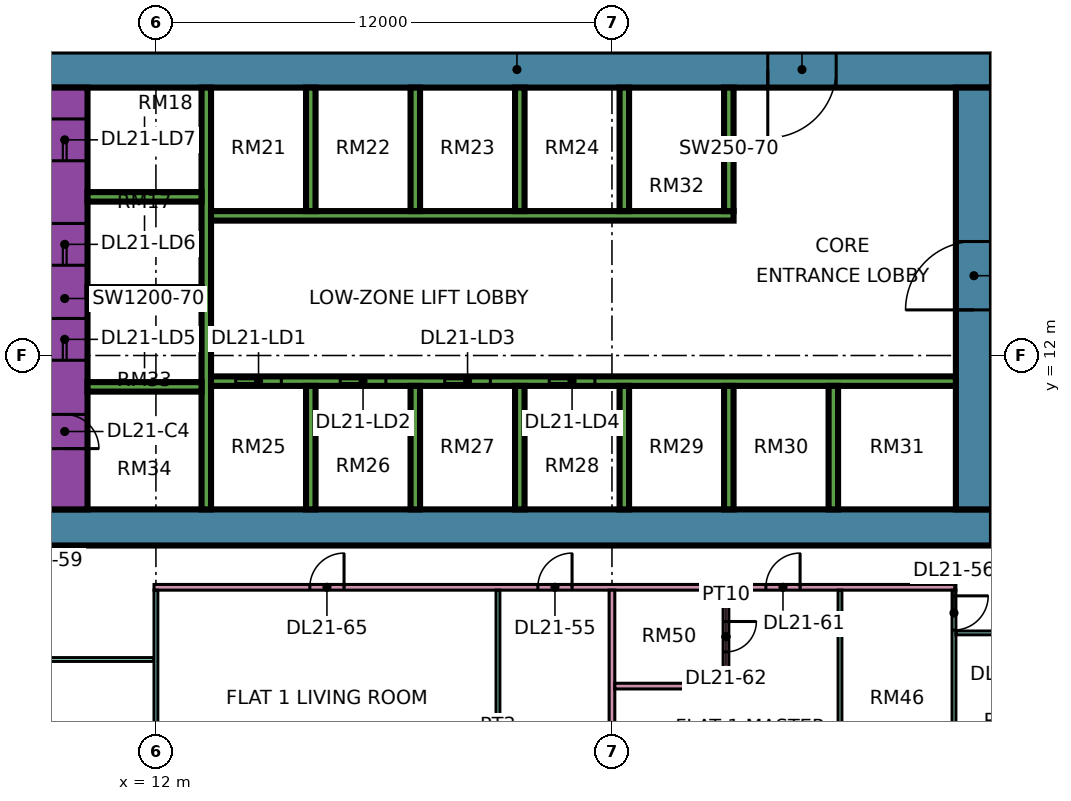
"""IFC4 building model, lengths in metres.
Left out: names, types, materials, properties, quantities, classifications, styles, units other than length and angle.
Written with IfcOpenShell. Run it as: python <this file> out.ifc"""

import sys

from ifc_helpers import new_model, si_unit, direction, frame, frame_2d, origin, place, context, subcontext, project, spatial, rectangle, extrude, element, fill, save


model = new_model("IFC4")
c1 = context("Model", 3, precision=1e-05, world=origin(), true_north=direction((0.0, 1.0)))
c2 = subcontext(c1, "Body", "Model", "MODEL_VIEW")
j1 = project(units=[si_unit("LENGTHUNIT", "METRE"), si_unit("PLANEANGLEUNIT", "RADIAN")], contexts=[c1])
p1 = place(None, origin())
s1 = spatial("IfcSite", under=j1, at=p1, CompositionType="ELEMENT")
p2 = place(p1, origin())
s2 = spatial("IfcBuilding", under=s1, at=p2, CompositionType="ELEMENT")
p3 = place(p2, frame((0.0, 0.0, 95.65)))
s3 = spatial("IfcBuildingStorey", under=s2, at=p3, CompositionType="ELEMENT", Elevation=95.65)
p4 = place(p3, frame((9.0, 7.475, 0.0), z_axis=(0.0, 0.0, 1.0), x_axis=(1.0, 0.0, 0.0)))
e1 = element("IfcWall", 1, at=p4, inside=s3, PredefinedType="SHEAR", context=c2, shape_type="SweptSolid", body=[
    extrude(rectangle(XDim=25.0, YDim=0.95, at=frame_2d((12.5, 0.0))), origin(), (0.0, 0.0, 1.0), 3.75),
])
p5 = place(p3, frame((9.0, 19.525, 0.0), z_axis=(0.0, 0.0, 1.0), x_axis=(1.0, 0.0, 0.0)))
e2 = element("IfcWall", 2, at=p5, inside=s3, PredefinedType="SHEAR", context=c2, shape_type="SweptSolid", body=[
    extrude(rectangle(XDim=25.0, YDim=0.95, at=frame_2d((12.5, 0.0))), origin(), (0.0, 0.0, 1.0), 3.75),
])
p6 = place(p5, frame((19.1, 0.0, 0.0)))
e3 = element("IfcOpeningElement", 3, at=p6, cuts=e2, PredefinedType="OPENING", context=c2, shape_type="SweptSolid", body=[
    extrude(rectangle(XDim=1.8, YDim=2.4, at=frame_2d((0.9, 1.2))), frame((0.0, 0.485, 0.0), z_axis=(0.0, -1.0, 0.0), x_axis=(1.0, 0.0, 0.0)), (0.0, 0.0, 1.0), 0.97),
])
p7 = place(p3, frame((9.6, 7.95, 0.0), z_axis=(0.0, 0.0, 1.0), x_axis=(0.0, 1.0, 0.0)))
e4 = element("IfcWall", 4, at=p7, inside=s3, PredefinedType="SHEAR", context=c2, shape_type="SweptSolid", body=[
    extrude(rectangle(XDim=11.1, YDim=1.2, at=frame_2d((5.55, 0.0))), origin(), (0.0, 0.0, 1.0), 3.75),
])
p8 = place(p7, frame((3.925, 0.0, 0.0)))
e5 = element("IfcOpeningElement", 5, at=p8, cuts=e4, PredefinedType="OPENING", context=c2, shape_type="SweptSolid", body=[
    extrude(rectangle(XDim=1.1, YDim=2.2, at=frame_2d((0.55, 1.1))), frame((0.0, 0.61, 0.0), z_axis=(0.0, -1.0, 0.0), x_axis=(1.0, 0.0, 0.0)), (0.0, 0.0, 1.0), 1.22),
])
p9 = place(p7, frame((6.425, 0.0, 0.0)))
e6 = element("IfcOpeningElement", 6, at=p9, cuts=e4, PredefinedType="OPENING", context=c2, shape_type="SweptSolid", body=[
    extrude(rectangle(XDim=1.1, YDim=2.2, at=frame_2d((0.55, 1.1))), frame((0.0, 0.61, 0.0), z_axis=(0.0, -1.0, 0.0), x_axis=(1.0, 0.0, 0.0)), (0.0, 0.0, 1.0), 1.22),
])
p10 = place(p7, frame((9.175, 0.0, 0.0)))
e7 = element("IfcOpeningElement", 7, at=p10, cuts=e4, PredefinedType="OPENING", context=c2, shape_type="SweptSolid", body=[
    extrude(rectangle(XDim=1.1, YDim=2.2, at=frame_2d((0.55, 1.1))), frame((0.0, 0.61, 0.0), z_axis=(0.0, -1.0, 0.0), x_axis=(1.0, 0.0, 0.0)), (0.0, 0.0, 1.0), 1.22),
])
p11 = place(p7, frame((1.6, 0.0, 0.0)))
e8 = element("IfcOpeningElement", 8, at=p11, cuts=e4, PredefinedType="OPENING", context=c2, shape_type="SweptSolid", body=[
    extrude(rectangle(XDim=0.9, YDim=2.1, at=frame_2d((0.45, 1.05))), frame((0.0, 0.61, 0.0), z_axis=(0.0, -1.0, 0.0), x_axis=(1.0, 0.0, 0.0)), (0.0, 0.0, 1.0), 1.22),
])
p12 = place(p3, frame((33.525, 7.95, 0.0), z_axis=(0.0, 0.0, 1.0), x_axis=(0.0, 1.0, 0.0)))
e9 = element("IfcWall", 9, at=p12, inside=s3, PredefinedType="SHEAR", context=c2, shape_type="SweptSolid", body=[
    extrude(rectangle(XDim=11.1, YDim=0.95, at=frame_2d((5.55, 0.0))), origin(), (0.0, 0.0, 1.0), 3.75),
])
p13 = place(p12, frame((5.25, 0.0, 0.0)))
e10 = element("IfcOpeningElement", 10, at=p13, cuts=e9, PredefinedType="OPENING", context=c2, shape_type="SweptSolid", body=[
    extrude(rectangle(XDim=1.8, YDim=2.4, at=frame_2d((0.9, 1.2))), frame((0.0, 0.485, 0.0), z_axis=(0.0, -1.0, 0.0), x_axis=(1.0, 0.0, 0.0)), (0.0, 0.0, 1.0), 0.97),
])
p14 = place(p3, frame((13.325, 7.95, 0.0), z_axis=(0.0, 0.0, 1.0), x_axis=(0.0, 1.0, 0.0)))
e11 = element("IfcWall", 11, at=p14, inside=s3, PredefinedType="SHEAR", context=c2, shape_type="SweptSolid", body=[
    extrude(rectangle(XDim=11.1, YDim=0.25, at=frame_2d((5.55, 0.0))), origin(), (0.0, 0.0, 1.0), 3.75),
])
p15 = place(p3, frame((13.45, 11.325, 0.0), z_axis=(0.0, 0.0, 1.0), x_axis=(1.0, 0.0, 0.0)))
e12 = element("IfcWall", 12, at=p15, inside=s3, PredefinedType="SHEAR", context=c2, shape_type="SweptSolid", body=[
    extrude(rectangle(XDim=19.6, YDim=0.25, at=frame_2d((9.8, 0.0))), origin(), (0.0, 0.0, 1.0), 3.75),
])
p16 = place(p15, frame((0.65, 0.0, 0.0)))
e13 = element("IfcOpeningElement", 13, at=p16, cuts=e12, PredefinedType="OPENING", context=c2, shape_type="SweptSolid", body=[
    extrude(rectangle(XDim=1.2, YDim=2.2, at=frame_2d((0.6, 1.1))), frame((0.0, 0.135, 0.0), z_axis=(0.0, -1.0, 0.0), x_axis=(1.0, 0.0, 0.0)), (0.0, 0.0, 1.0), 0.27),
])
p17 = place(p15, frame((3.4, 0.0, 0.0)))
e14 = element("IfcOpeningElement", 14, at=p17, cuts=e12, PredefinedType="OPENING", context=c2, shape_type="SweptSolid", body=[
    extrude(rectangle(XDim=1.2, YDim=2.2, at=frame_2d((0.6, 1.1))), frame((0.0, 0.135, 0.0), z_axis=(0.0, -1.0, 0.0), x_axis=(1.0, 0.0, 0.0)), (0.0, 0.0, 1.0), 0.27),
])
p18 = place(p15, frame((6.15, 0.0, 0.0)))
e15 = element("IfcOpeningElement", 15, at=p18, cuts=e12, PredefinedType="OPENING", context=c2, shape_type="SweptSolid", body=[
    extrude(rectangle(XDim=1.2, YDim=2.2, at=frame_2d((0.6, 1.1))), frame((0.0, 0.135, 0.0), z_axis=(0.0, -1.0, 0.0), x_axis=(1.0, 0.0, 0.0)), (0.0, 0.0, 1.0), 0.27),
])
p19 = place(p15, frame((8.9, 0.0, 0.0)))
e16 = element("IfcOpeningElement", 16, at=p19, cuts=e12, PredefinedType="OPENING", context=c2, shape_type="SweptSolid", body=[
    extrude(rectangle(XDim=1.2, YDim=2.2, at=frame_2d((0.6, 1.1))), frame((0.0, 0.135, 0.0), z_axis=(0.0, -1.0, 0.0), x_axis=(1.0, 0.0, 0.0)), (0.0, 0.0, 1.0), 0.27),
])
p20 = place(p3, frame((13.45, 15.675, 0.0), z_axis=(0.0, 0.0, 1.0), x_axis=(1.0, 0.0, 0.0)))
e17 = element("IfcWall", 17, at=p20, inside=s3, PredefinedType="SHEAR", context=c2, shape_type="SweptSolid", body=[
    extrude(rectangle(XDim=13.75, YDim=0.25, at=frame_2d((6.875, 0.0))), origin(), (0.0, 0.0, 1.0), 3.75),
])
for number, where, z_axis, x_axis in (
    (18, (10.2, 11.175, 0.0), (0.0, 0.0, 1.0), (1.0, 0.0, 0.0)),
    (19, (10.2, 13.675, 0.0), (0.0, 0.0, 1.0), (1.0, 0.0, 0.0)),
    (20, (10.2, 16.175, 0.0), (0.0, 0.0, 1.0), (1.0, 0.0, 0.0)),
):
    element("IfcWall", number, at=place(p3, frame(where, z_axis=z_axis, x_axis=x_axis)), inside=s3, PredefinedType="SHEAR", context=c2, shape_type="SweptSolid", body=[
        extrude(rectangle(XDim=3.0, YDim=0.25, at=frame_2d((1.5, 0.0))), origin(), (0.0, 0.0, 1.0), 3.75),
    ])
for number, where, z_axis, x_axis in (
    (21, (16.075, 7.95, 0.0), (0.0, 0.0, 1.0), (0.0, 1.0, 0.0)),
    (22, (18.825, 7.95, 0.0), (0.0, 0.0, 1.0), (0.0, 1.0, 0.0)),
    (23, (21.575, 7.95, 0.0), (0.0, 0.0, 1.0), (0.0, 1.0, 0.0)),
    (24, (24.325, 7.95, 0.0), (0.0, 0.0, 1.0), (0.0, 1.0, 0.0)),
    (25, (27.075, 7.95, 0.0), (0.0, 0.0, 1.0), (0.0, 1.0, 0.0)),
    (26, (29.825, 7.95, 0.0), (0.0, 0.0, 1.0), (0.0, 1.0, 0.0)),
    (27, (16.075, 15.8, 0.0), (0.0, 0.0, 1.0), (0.0, 1.0, 0.0)),
    (28, (18.825, 15.8, 0.0), (0.0, 0.0, 1.0), (0.0, 1.0, 0.0)),
    (29, (21.575, 15.8, 0.0), (0.0, 0.0, 1.0), (0.0, 1.0, 0.0)),
    (30, (24.325, 15.8, 0.0), (0.0, 0.0, 1.0), (0.0, 1.0, 0.0)),
    (31, (27.075, 15.8, 0.0), (0.0, 0.0, 1.0), (0.0, 1.0, 0.0)),
):
    element("IfcWall", number, at=place(p3, frame(where, z_axis=z_axis, x_axis=x_axis)), inside=s3, PredefinedType="SHEAR", context=c2, shape_type="SweptSolid", body=[
        extrude(rectangle(XDim=3.25, YDim=0.25, at=frame_2d((1.625, 0.0))), origin(), (0.0, 0.0, 1.0), 3.75),
    ])
p21 = place(p3, frame((-1.447, 12.553, 0.0), z_axis=(0.0, 0.0, 1.0), x_axis=(0.707106781187, -0.707106781187, 0.0)))
e32 = element("IfcWall", 32, at=p21, inside=s3, PredefinedType="SOLIDWALL", context=c2, shape_type="SweptSolid", body=[
    extrude(rectangle(XDim=19.799, YDim=0.15, at=frame_2d((9.899, 0.0))), origin(), (0.0, 0.0, 1.0), 3.35),
])
p22 = place(p21, frame((2.212, 0.0, 0.45)))
e33 = element("IfcOpeningElement", 33, at=p22, cuts=e32, PredefinedType="OPENING", context=c2, shape_type="SweptSolid", body=[
    extrude(rectangle(XDim=3.0, YDim=2.4, at=frame_2d((1.5, 1.2))), frame((0.0, 0.085, 0.0), z_axis=(0.0, -1.0, 0.0), x_axis=(1.0, 0.0, 0.0)), (0.0, 0.0, 1.0), 0.17),
])
p23 = place(p21, frame((10.216, 0.0, 0.45)))
e34 = element("IfcOpeningElement", 34, at=p23, cuts=e32, PredefinedType="OPENING", context=c2, shape_type="SweptSolid", body=[
    extrude(rectangle(XDim=3.0, YDim=2.4, at=frame_2d((1.5, 1.2))), frame((0.0, 0.085, 0.0), z_axis=(0.0, -1.0, 0.0), x_axis=(1.0, 0.0, 0.0)), (0.0, 0.0, 1.0), 0.17),
])
p24 = place(p3, frame((9.05, 4.0, 0.0), z_axis=(0.0, 0.0, 1.0), x_axis=(1.0, 0.0, 0.0)))
e35 = element("IfcWall", 35, at=p24, inside=s3, PredefinedType="PARTITIONING", context=c2, shape_type="SweptSolid", body=[
    extrude(rectangle(XDim=2.9, YDim=0.1, at=frame_2d((1.45, 0.0))), origin(), (0.0, 0.0, 1.0), 3.35),
])
p25 = place(p3, frame((11.95, 5.9, 0.0), z_axis=(0.0, 0.0, 1.0), x_axis=(1.0, 0.0, 0.0)))
e36 = element("IfcWall", 36, at=p25, inside=s3, PredefinedType="PARTITIONING", context=c2, shape_type="SweptSolid", body=[
    extrude(rectangle(XDim=21.1, YDim=0.15, at=frame_2d((10.55, 0.0))), origin(), (0.0, 0.0, 1.0), 3.35),
])
p26 = place(p25, frame((10.1, 0.0, 0.0)))
e37 = element("IfcOpeningElement", 37, at=p26, cuts=e36, PredefinedType="OPENING", context=c2, shape_type="SweptSolid", body=[
    extrude(rectangle(XDim=0.9, YDim=2.1, at=frame_2d((0.45, 1.05))), frame((0.0, 0.085, 0.0), z_axis=(0.0, -1.0, 0.0), x_axis=(1.0, 0.0, 0.0)), (0.0, 0.0, 1.0), 0.17),
])
p27 = place(p25, frame((16.1, 0.0, 0.0)))
e38 = element("IfcOpeningElement", 38, at=p27, cuts=e36, PredefinedType="OPENING", context=c2, shape_type="SweptSolid", body=[
    extrude(rectangle(XDim=0.9, YDim=2.1, at=frame_2d((0.45, 1.05))), frame((0.0, 0.085, 0.0), z_axis=(0.0, -1.0, 0.0), x_axis=(1.0, 0.0, 0.0)), (0.0, 0.0, 1.0), 0.17),
])
p28 = place(p25, frame((4.1, 0.0, 0.0)))
e39 = element("IfcOpeningElement", 39, at=p28, cuts=e36, PredefinedType="OPENING", context=c2, shape_type="SweptSolid", body=[
    extrude(rectangle(XDim=0.9, YDim=2.1, at=frame_2d((0.45, 1.05))), frame((0.0, 0.085, 0.0), z_axis=(0.0, -1.0, 0.0), x_axis=(1.0, 0.0, 0.0)), (0.0, 0.0, 1.0), 0.17),
])
p29 = place(p3, frame((12.0, -0.788, 0.0), z_axis=(0.0, 0.0, 1.0), x_axis=(0.0, 1.0, 0.0)))
e40 = element("IfcWall", 40, at=p29, inside=s3, PredefinedType="PARTITIONING", context=c2, shape_type="SweptSolid", body=[
    extrude(rectangle(XDim=6.613, YDim=0.1, at=frame_2d((3.306, 0.0))), origin(), (0.0, 0.0, 1.0), 3.35),
])
p30 = place(p3, frame((21.0, -1.35, 0.0), z_axis=(0.0, 0.0, 1.0), x_axis=(0.0, 1.0, 0.0)))
e41 = element("IfcWall", 41, at=p30, inside=s3, PredefinedType="PARTITIONING", context=c2, shape_type="SweptSolid", body=[
    extrude(rectangle(XDim=7.175, YDim=0.1, at=frame_2d((3.587, 0.0))), origin(), (0.0, 0.0, 1.0), 3.35),
])
p31 = place(p3, frame((24.0, 0.0, 0.0), z_axis=(0.0, 0.0, 1.0), x_axis=(0.0, 1.0, 0.0)))
e42 = element("IfcWall", 42, at=p31, inside=s3, PredefinedType="PARTITIONING", context=c2, shape_type="SweptSolid", body=[
    extrude(rectangle(XDim=5.825, YDim=0.15, at=frame_2d((2.913, 0.0))), origin(), (0.0, 0.0, 1.0), 3.35),
])
p32 = place(p3, frame((24.075, 3.3, 0.0), z_axis=(0.0, 0.0, 1.0), x_axis=(1.0, 0.0, 0.0)))
e43 = element("IfcWall", 43, at=p32, inside=s3, PredefinedType="PARTITIONING", context=c2, shape_type="SweptSolid", body=[
    extrude(rectangle(XDim=3.0, YDim=0.15, at=frame_2d((1.5, 0.0))), origin(), (0.0, 0.0, 1.0), 3.35),
])
p33 = place(p3, frame((27.0, 3.375, 0.0), z_axis=(0.0, 0.0, 1.0), x_axis=(0.0, 1.0, 0.0)))
e44 = element("IfcWall", 44, at=p33, inside=s3, PredefinedType="PARTITIONING", context=c2, shape_type="SweptSolid", body=[
    extrude(rectangle(XDim=2.45, YDim=0.15, at=frame_2d((1.225, 0.0))), origin(), (0.0, 0.0, 1.0), 3.35),
])
p34 = place(p33, frame((0.825, 0.0, 0.0)))
e45 = element("IfcOpeningElement", 45, at=p34, cuts=e44, PredefinedType="OPENING", context=c2, shape_type="SweptSolid", body=[
    extrude(rectangle(XDim=0.8, YDim=2.1, at=frame_2d((0.4, 1.05))), frame((0.0, 0.085, 0.0), z_axis=(0.0, -1.0, 0.0), x_axis=(1.0, 0.0, 0.0)), (0.0, 0.0, 1.0), 0.17),
])
p35 = place(p3, frame((30.0, 0.074, 0.0), z_axis=(0.0, 0.0, 1.0), x_axis=(0.0, 1.0, 0.0)))
e46 = element("IfcWall", 46, at=p35, inside=s3, PredefinedType="PARTITIONING", context=c2, shape_type="SweptSolid", body=[
    extrude(rectangle(XDim=5.751, YDim=0.1, at=frame_2d((2.875, 0.0))), origin(), (0.0, 0.0, 1.0), 3.35),
])
p36 = place(p3, frame((33.0, 0.074, 0.0), z_axis=(0.0, 0.0, 1.0), x_axis=(0.0, 1.0, 0.0)))
e47 = element("IfcWall", 47, at=p36, inside=s3, PredefinedType="PARTITIONING", context=c2, shape_type="SweptSolid", body=[
    extrude(rectangle(XDim=5.751, YDim=0.1, at=frame_2d((2.875, 0.0))), origin(), (0.0, 0.0, 1.0), 3.35),
])
p37 = place(p36, frame((4.701, 0.0, 0.0)))
e48 = element("IfcOpeningElement", 48, at=p37, cuts=e47, PredefinedType="OPENING", context=c2, shape_type="SweptSolid", body=[
    extrude(rectangle(XDim=0.9, YDim=2.1, at=frame_2d((0.45, 1.05))), frame((0.0, 0.06, 0.0), z_axis=(0.0, -1.0, 0.0), x_axis=(1.0, 0.0, 0.0)), (0.0, 0.0, 1.0), 0.12),
])
p38 = place(p3, frame((33.05, 4.7, 0.0), z_axis=(0.0, 0.0, 1.0), x_axis=(1.0, 0.0, 0.0)))
e49 = element("IfcWall", 49, at=p38, inside=s3, PredefinedType="PARTITIONING", context=c2, shape_type="SweptSolid", body=[
    extrude(rectangle(XDim=14.85, YDim=0.1, at=frame_2d((7.425, 0.0))), origin(), (0.0, 0.0, 1.0), 3.35),
])
p39 = place(p38, frame((1.0, 0.0, 0.0)))
e50 = element("IfcOpeningElement", 50, at=p39, cuts=e49, PredefinedType="OPENING", context=c2, shape_type="SweptSolid", body=[
    extrude(rectangle(XDim=0.9, YDim=2.1, at=frame_2d((0.45, 1.05))), frame((0.0, 0.06, 0.0), z_axis=(0.0, -1.0, 0.0), x_axis=(1.0, 0.0, 0.0)), (0.0, 0.0, 1.0), 0.12),
])
p40 = place(p38, frame((13.0, 0.0, 0.0)))
e51 = element("IfcOpeningElement", 51, at=p40, cuts=e49, PredefinedType="OPENING", context=c2, shape_type="SweptSolid", body=[
    extrude(rectangle(XDim=0.9, YDim=2.1, at=frame_2d((0.45, 1.05))), frame((0.0, 0.06, 0.0), z_axis=(0.0, -1.0, 0.0), x_axis=(1.0, 0.0, 0.0)), (0.0, 0.0, 1.0), 0.12),
])
p41 = place(p38, frame((7.0, 0.0, 0.0)))
e52 = element("IfcOpeningElement", 52, at=p41, cuts=e49, PredefinedType="OPENING", context=c2, shape_type="SweptSolid", body=[
    extrude(rectangle(XDim=0.9, YDim=2.1, at=frame_2d((0.45, 1.05))), frame((0.0, 0.06, 0.0), z_axis=(0.0, -1.0, 0.0), x_axis=(1.0, 0.0, 0.0)), (0.0, 0.0, 1.0), 0.12),
])
p42 = place(p16, origin())
e53 = element("IfcDoor", 53, at=p42, inside=s3, OperationType="DOUBLE_DOOR_SLIDING", PredefinedType="DOOR", context=c2, shape_type="SweptSolid", body=[
    extrude(rectangle(XDim=1.2, YDim=2.2, at=frame_2d((0.6, 1.1))), frame((0.0, 0.025, 0.0), z_axis=(0.0, -1.0, 0.0), x_axis=(1.0, 0.0, 0.0)), (0.0, 0.0, 1.0), 0.05),
])
fill(e13, e53)
p43 = place(p17, origin())
e54 = element("IfcDoor", 54, at=p43, inside=s3, OperationType="DOUBLE_DOOR_SLIDING", PredefinedType="DOOR", context=c2, shape_type="SweptSolid", body=[
    extrude(rectangle(XDim=1.2, YDim=2.2, at=frame_2d((0.6, 1.1))), frame((0.0, 0.025, 0.0), z_axis=(0.0, -1.0, 0.0), x_axis=(1.0, 0.0, 0.0)), (0.0, 0.0, 1.0), 0.05),
])
fill(e14, e54)
p44 = place(p18, origin())
e55 = element("IfcDoor", 55, at=p44, inside=s3, OperationType="DOUBLE_DOOR_SLIDING", PredefinedType="DOOR", context=c2, shape_type="SweptSolid", body=[
    extrude(rectangle(XDim=1.2, YDim=2.2, at=frame_2d((0.6, 1.1))), frame((0.0, 0.025, 0.0), z_axis=(0.0, -1.0, 0.0), x_axis=(1.0, 0.0, 0.0)), (0.0, 0.0, 1.0), 0.05),
])
fill(e15, e55)
p45 = place(p19, origin())
e56 = element("IfcDoor", 56, at=p45, inside=s3, OperationType="DOUBLE_DOOR_SLIDING", PredefinedType="DOOR", context=c2, shape_type="SweptSolid", body=[
    extrude(rectangle(XDim=1.2, YDim=2.2, at=frame_2d((0.6, 1.1))), frame((0.0, 0.025, 0.0), z_axis=(0.0, -1.0, 0.0), x_axis=(1.0, 0.0, 0.0)), (0.0, 0.0, 1.0), 0.05),
])
fill(e16, e56)
p46 = place(p8, origin())
e57 = element("IfcDoor", 57, at=p46, inside=s3, OperationType="DOUBLE_DOOR_SLIDING", PredefinedType="DOOR", context=c2, shape_type="SweptSolid", body=[
    extrude(rectangle(XDim=1.1, YDim=2.2, at=frame_2d((0.55, 1.1))), frame((0.0, 0.025, 0.0), z_axis=(0.0, -1.0, 0.0), x_axis=(1.0, 0.0, 0.0)), (0.0, 0.0, 1.0), 0.05),
])
fill(e5, e57)
p47 = place(p9, origin())
e58 = element("IfcDoor", 58, at=p47, inside=s3, OperationType="DOUBLE_DOOR_SLIDING", PredefinedType="DOOR", context=c2, shape_type="SweptSolid", body=[
    extrude(rectangle(XDim=1.1, YDim=2.2, at=frame_2d((0.55, 1.1))), frame((0.0, 0.025, 0.0), z_axis=(0.0, -1.0, 0.0), x_axis=(1.0, 0.0, 0.0)), (0.0, 0.0, 1.0), 0.05),
])
fill(e6, e58)
p48 = place(p10, origin())
e59 = element("IfcDoor", 59, at=p48, inside=s3, OperationType="DOUBLE_DOOR_SLIDING", PredefinedType="DOOR", context=c2, shape_type="SweptSolid", body=[
    extrude(rectangle(XDim=1.1, YDim=2.2, at=frame_2d((0.55, 1.1))), frame((0.0, 0.025, 0.0), z_axis=(0.0, -1.0, 0.0), x_axis=(1.0, 0.0, 0.0)), (0.0, 0.0, 1.0), 0.05),
])
fill(e7, e59)
p49 = place(p13, origin())
e60 = element("IfcDoor", 60, at=p49, inside=s3, OperationType="DOUBLE_DOOR_SINGLE_SWING", PredefinedType="DOOR", context=c2, shape_type="SweptSolid", body=[
    extrude(rectangle(XDim=1.8, YDim=2.4, at=frame_2d((0.9, 1.2))), frame((0.0, 0.025, 0.0), z_axis=(0.0, -1.0, 0.0), x_axis=(1.0, 0.0, 0.0)), (0.0, 0.0, 1.0), 0.05),
])
fill(e10, e60)
p50 = place(p6, frame((1.8, 0.0, 0.0), z_axis=(0.0, 0.0, 1.0), x_axis=(-1.0, 0.0, 0.0)))
e61 = element("IfcDoor", 61, at=p50, inside=s3, OperationType="DOUBLE_DOOR_SINGLE_SWING", PredefinedType="DOOR", context=c2, shape_type="SweptSolid", body=[
    extrude(rectangle(XDim=1.8, YDim=2.4, at=frame_2d((0.9, 1.2))), frame((0.0, 0.025, 0.0), z_axis=(0.0, -1.0, 0.0), x_axis=(1.0, 0.0, 0.0)), (0.0, 0.0, 1.0), 0.05),
])
fill(e3, e61)
p51 = place(p11, frame((0.9, 0.0, 0.0), z_axis=(0.0, 0.0, 1.0), x_axis=(-1.0, 0.0, 0.0)))
e62 = element("IfcDoor", 62, at=p51, inside=s3, OperationType="SINGLE_SWING_LEFT", PredefinedType="DOOR", context=c2, shape_type="SweptSolid", body=[
    extrude(rectangle(XDim=0.9, YDim=2.1, at=frame_2d((0.45, 1.05))), frame((0.0, 0.025, 0.0), z_axis=(0.0, -1.0, 0.0), x_axis=(1.0, 0.0, 0.0)), (0.0, 0.0, 1.0), 0.05),
])
fill(e8, e62)
p52 = place(p26, frame((0.9, 0.0, 0.0), z_axis=(0.0, 0.0, 1.0), x_axis=(-1.0, 0.0, 0.0)))
e63 = element("IfcDoor", 63, at=p52, inside=s3, OperationType="SINGLE_SWING_RIGHT", PredefinedType="DOOR", context=c2, shape_type="SweptSolid", body=[
    extrude(rectangle(XDim=0.9, YDim=2.1, at=frame_2d((0.45, 1.05))), frame((0.0, 0.025, 0.0), z_axis=(0.0, -1.0, 0.0), x_axis=(1.0, 0.0, 0.0)), (0.0, 0.0, 1.0), 0.05),
])
fill(e37, e63)
p53 = place(p37, origin())
e64 = element("IfcDoor", 64, at=p53, inside=s3, OperationType="SINGLE_SWING_RIGHT", PredefinedType="DOOR", context=c2, shape_type="SweptSolid", body=[
    extrude(rectangle(XDim=0.9, YDim=2.1, at=frame_2d((0.45, 1.05))), frame((0.0, 0.025, 0.0), z_axis=(0.0, -1.0, 0.0), x_axis=(1.0, 0.0, 0.0)), (0.0, 0.0, 1.0), 0.05),
])
fill(e48, e64)
p54 = place(p27, frame((0.9, 0.0, 0.0), z_axis=(0.0, 0.0, 1.0), x_axis=(-1.0, 0.0, 0.0)))
e65 = element("IfcDoor", 65, at=p54, inside=s3, OperationType="SINGLE_SWING_RIGHT", PredefinedType="DOOR", context=c2, shape_type="SweptSolid", body=[
    extrude(rectangle(XDim=0.9, YDim=2.1, at=frame_2d((0.45, 1.05))), frame((0.0, 0.025, 0.0), z_axis=(0.0, -1.0, 0.0), x_axis=(1.0, 0.0, 0.0)), (0.0, 0.0, 1.0), 0.05),
])
fill(e38, e65)
p55 = place(p34, origin())
e66 = element("IfcDoor", 66, at=p55, inside=s3, OperationType="SINGLE_SWING_RIGHT", PredefinedType="DOOR", context=c2, shape_type="SweptSolid", body=[
    extrude(rectangle(XDim=0.8, YDim=2.1, at=frame_2d((0.4, 1.05))), frame((0.0, 0.025, 0.0), z_axis=(0.0, -1.0, 0.0), x_axis=(1.0, 0.0, 0.0)), (0.0, 0.0, 1.0), 0.05),
])
fill(e45, e66)
p56 = place(p28, frame((0.9, 0.0, 0.0), z_axis=(0.0, 0.0, 1.0), x_axis=(-1.0, 0.0, 0.0)))
e67 = element("IfcDoor", 67, at=p56, inside=s3, OperationType="SINGLE_SWING_RIGHT", PredefinedType="DOOR", context=c2, shape_type="SweptSolid", body=[
    extrude(rectangle(XDim=0.9, YDim=2.1, at=frame_2d((0.45, 1.05))), frame((0.0, 0.025, 0.0), z_axis=(0.0, -1.0, 0.0), x_axis=(1.0, 0.0, 0.0)), (0.0, 0.0, 1.0), 0.05),
])
fill(e39, e67)
save(model, sys.argv[1])
